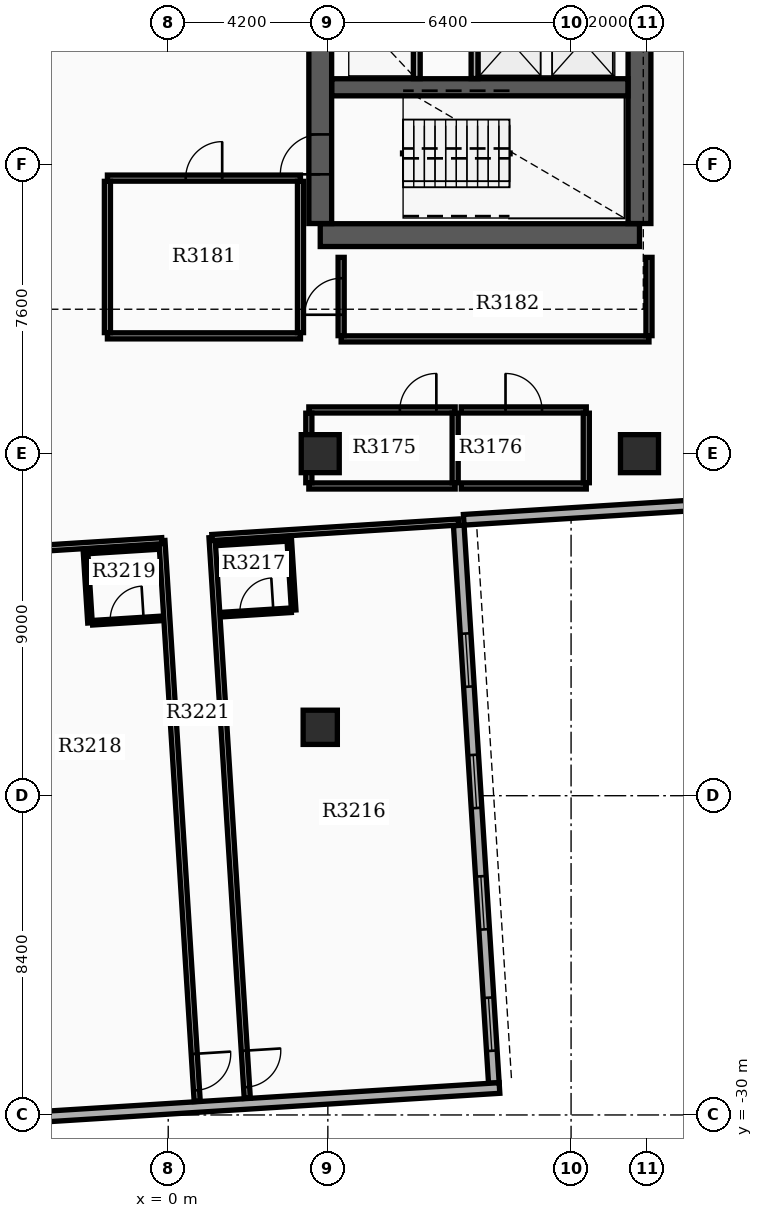
"""IFC4 building model, lengths in metres.
Left out: names, types, materials, properties, quantities, classifications, styles, units other than length and angle.
Written with IfcOpenShell. Run it as: python <this file> out.ifc"""

import sys

from ifc_helpers import new_model, si_unit, direction, frame, frame_2d, origin, origin_2d, place, context, subcontext, project, spatial, rectangle, extrude, element, fill, save


model = new_model("IFC4")
c1 = context("Model", 3, precision=1e-05, world=origin(), true_north=direction((0.0, 1.0)))
c2 = subcontext(c1, "Body", "Model", "MODEL_VIEW")
j1 = project(units=[si_unit("LENGTHUNIT", "METRE"), si_unit("PLANEANGLEUNIT", "RADIAN")], contexts=[c1])
p1 = place(None, origin())
s1 = spatial("IfcSite", under=j1, at=p1, CompositionType="ELEMENT")
p2 = place(p1, origin())
s2 = spatial("IfcBuilding", under=s1, at=p2, CompositionType="ELEMENT")
p3 = place(p2, frame((0.0, 0.0, 201.3)))
s3 = spatial("IfcBuildingStorey", under=s2, at=p3, CompositionType="ELEMENT", Elevation=201.3)
p4 = place(p3, frame((4.0, -6.85, 0.0), z_axis=(0.0, 0.0, 1.0), x_axis=(1.0, 0.0, 0.0)))
e1 = element("IfcWall", 1, at=p4, inside=s3, PredefinedType="SHEAR", context=c2, shape_type="SweptSolid", body=[
    extrude(rectangle(XDim=8.4, YDim=0.6, at=frame_2d((4.2, 0.0))), origin(), (0.0, 0.0, 1.0), 3.7),
])
p5 = place(p3, frame((4.0, -6.545, 0.0), z_axis=(0.0, 0.0, 1.0), x_axis=(0.0, 1.0, 0.0)))
e2 = element("IfcWall", 2, at=p5, inside=s3, PredefinedType="SHEAR", context=c2, shape_type="SweptSolid", body=[
    extrude(rectangle(XDim=11.19, YDim=0.6, at=frame_2d((5.595, 0.0))), origin(), (0.0, 0.0, 1.0), 3.7),
])
p6 = place(p5, frame((1.295, 0.0, 0.0)))
e3 = element("IfcOpeningElement", 3, at=p6, cuts=e2, PredefinedType="OPENING", context=c2, shape_type="SweptSolid", body=[
    extrude(rectangle(XDim=1.05, YDim=2.15, at=frame_2d((0.525, 1.075))), frame((0.0, 0.31, 0.0), z_axis=(0.0, -1.0, 0.0), x_axis=(1.0, 0.0, 0.0)), (0.0, 0.0, 1.0), 0.62),
])
p7 = place(p5, frame((6.895, 0.0, 0.0)))
e4 = element("IfcOpeningElement", 4, at=p7, cuts=e2, PredefinedType="OPENING", context=c2, shape_type="SweptSolid", body=[
    extrude(rectangle(XDim=1.05, YDim=2.15, at=frame_2d((0.525, 1.075))), frame((0.0, 0.31, 0.0), z_axis=(0.0, -1.0, 0.0), x_axis=(1.0, 0.0, 0.0)), (0.0, 0.0, 1.0), 0.62),
])
p8 = place(p3, frame((12.4, -6.545, 0.0), z_axis=(0.0, 0.0, 1.0), x_axis=(0.0, 1.0, 0.0)))
e5 = element("IfcWall", 5, at=p8, inside=s3, PredefinedType="SHEAR", context=c2, shape_type="SweptSolid", body=[
    extrude(rectangle(XDim=11.19, YDim=0.6, at=frame_2d((5.595, 0.0))), origin(), (0.0, 0.0, 1.0), 3.7),
])
p9 = place(p3, frame((4.305, -2.96, 0.0), z_axis=(0.0, 0.0, 1.0), x_axis=(1.0, 0.0, 0.0)))
e6 = element("IfcWall", 6, at=p9, inside=s3, PredefinedType="SHEAR", context=c2, shape_type="SweptSolid", body=[
    extrude(rectangle(XDim=7.79, YDim=0.45, at=frame_2d((3.895, 0.0))), origin(), (0.0, 0.0, 1.0), 3.7),
])
for number, where, z_axis, x_axis in (
    (7, (12.4, -12.6, 0.0), (0.0, 0.0, 1.0), (1.0, 0.0, 0.0)),
    (8, (4.0, -12.6, 0.0), (0.0, 0.0, 1.0), (1.0, 0.0, 0.0)),
):
    element("IfcColumn", number, at=place(p3, frame(where, z_axis=z_axis, x_axis=x_axis)), inside=s3, PredefinedType="COLUMN", context=c2, shape_type="SweptSolid", body=[
        extrude(rectangle(XDim=1.0, YDim=1.0, at=origin_2d()), origin(), (0.0, 0.0, 1.0), 3.9),
    ])
p10 = place(p3, frame((4.0, -19.8, 0.0), z_axis=(0.0, 0.0, 1.0), x_axis=(1.0, 0.0, 0.0)))
e9 = element("IfcColumn", 9, at=p10, inside=s3, PredefinedType="COLUMN", context=c2, shape_type="SweptSolid", body=[
    extrude(rectangle(XDim=0.9, YDim=0.9, at=origin_2d()), origin(), (0.0, 0.0, 1.0), 3.9),
])
p11 = place(p3, frame((8.568, -29.16, 0.0), z_axis=(0.0, 0.0, 1.0), x_axis=(-0.062794967833, 0.998026448555, 0.0)))
e10 = element("IfcWall", 10, at=p11, inside=s3, PredefinedType="STANDARD", context=c2, shape_type="SweptSolid", body=[
    extrude(rectangle(XDim=14.7, YDim=0.28, at=frame_2d((7.35, 0.0))), origin(), (0.0, 0.0, 1.0), 3.18),
])
p12 = place(p11, frame((0.85, 0.0, 0.8)))
e11 = element("IfcOpeningElement", 11, at=p12, cuts=e10, PredefinedType="OPENING", context=c2, shape_type="SweptSolid", body=[
    extrude(rectangle(XDim=1.4, YDim=1.6, at=frame_2d((0.7, 0.8))), frame((0.0, 0.15, 0.0), z_axis=(0.0, -1.0, 0.0), x_axis=(1.0, 0.0, 0.0)), (0.0, 0.0, 1.0), 0.3),
])
p13 = place(p11, frame((4.05, 0.0, 0.8)))
e12 = element("IfcOpeningElement", 12, at=p13, cuts=e10, PredefinedType="OPENING", context=c2, shape_type="SweptSolid", body=[
    extrude(rectangle(XDim=1.4, YDim=1.6, at=frame_2d((0.7, 0.8))), frame((0.0, 0.15, 0.0), z_axis=(0.0, -1.0, 0.0), x_axis=(1.0, 0.0, 0.0)), (0.0, 0.0, 1.0), 0.3),
])
p14 = place(p11, frame((7.25, 0.0, 0.8)))
e13 = element("IfcOpeningElement", 13, at=p14, cuts=e10, PredefinedType="OPENING", context=c2, shape_type="SweptSolid", body=[
    extrude(rectangle(XDim=1.4, YDim=1.6, at=frame_2d((0.7, 0.8))), frame((0.0, 0.15, 0.0), z_axis=(0.0, -1.0, 0.0), x_axis=(1.0, 0.0, 0.0)), (0.0, 0.0, 1.0), 0.3),
])
p15 = place(p11, frame((10.45, 0.0, 0.8)))
e14 = element("IfcOpeningElement", 14, at=p15, cuts=e10, PredefinedType="OPENING", context=c2, shape_type="SweptSolid", body=[
    extrude(rectangle(XDim=1.4, YDim=1.6, at=frame_2d((0.7, 0.8))), frame((0.0, 0.15, 0.0), z_axis=(0.0, -1.0, 0.0), x_axis=(1.0, 0.0, 0.0)), (0.0, 0.0, 1.0), 0.3),
])
p16 = place(p3, frame((-4.977, -30.152, 0.0), z_axis=(0.0, 0.0, 1.0), x_axis=(0.998026318072, 0.062797041623, 0.0)))
e15 = element("IfcWall", 15, at=p16, inside=s3, PredefinedType="STANDARD", context=c2, shape_type="SweptSolid", body=[
    extrude(rectangle(XDim=13.72, YDim=0.28, at=frame_2d((6.86, 0.0))), origin(), (0.0, 0.0, 1.0), 3.18),
])
p17 = place(p16, frame((0.85, 0.0, 0.85)))
e16 = element("IfcOpeningElement", 16, at=p17, cuts=e15, PredefinedType="OPENING", context=c2, shape_type="SweptSolid", body=[
    extrude(rectangle(XDim=1.0, YDim=1.5, at=frame_2d((0.5, 0.75))), frame((0.0, 0.15, 0.0), z_axis=(0.0, -1.0, 0.0), x_axis=(1.0, 0.0, 0.0)), (0.0, 0.0, 1.0), 0.3),
])
p18 = place(p3, frame((14.063, -13.945, 0.0), z_axis=(0.0, 0.0, 1.0), x_axis=(-0.998027314704, -0.062781200242, 0.0)))
e17 = element("IfcWall", 17, at=p18, inside=s3, PredefinedType="STANDARD", context=c2, shape_type="SweptSolid", body=[
    extrude(rectangle(XDim=6.3, YDim=0.28, at=frame_2d((3.15, 0.0))), origin(), (0.0, 0.0, 1.0), 3.18),
])
for number, where, z_axis, x_axis in (
    (18, (6.54, -2.73, 0.0), (0.0, 0.0, 1.0), (0.0, 1.0, 0.0)),
    (19, (8.06, -2.73, 0.0), (0.0, 0.0, 1.0), (0.0, 1.0, 0.0)),
):
    element("IfcWall", number, at=place(p3, frame(where, z_axis=z_axis, x_axis=x_axis)), inside=s3, PredefinedType="SOLIDWALL", context=c2, shape_type="SweptSolid", body=[
        extrude(rectangle(XDim=1.89, YDim=0.18, at=frame_2d((0.945, 0.0))), origin(), (0.0, 0.0, 1.0), 3.17),
    ])
p19 = place(p3, frame((3.7, -13.45, 0.0), z_axis=(0.0, 0.0, 1.0), x_axis=(1.0, 0.0, 0.0)))
e20 = element("IfcWall", 20, at=p19, inside=s3, PredefinedType="PARTITIONING", context=c2, shape_type="SweptSolid", body=[
    extrude(rectangle(XDim=3.85, YDim=0.16, at=frame_2d((1.925, 0.0))), origin(), (0.0, 0.0, 1.0), 3.17),
])
p20 = place(p3, frame((3.7, -11.45, 0.0), z_axis=(0.0, 0.0, 1.0), x_axis=(1.0, 0.0, 0.0)))
e21 = element("IfcWall", 21, at=p20, inside=s3, PredefinedType="PARTITIONING", context=c2, shape_type="SweptSolid", body=[
    extrude(rectangle(XDim=3.85, YDim=0.16, at=frame_2d((1.925, 0.0))), origin(), (0.0, 0.0, 1.0), 3.17),
])
p21 = place(p20, frame((2.395, 0.0, 0.0)))
e22 = element("IfcOpeningElement", 22, at=p21, cuts=e21, PredefinedType="OPENING", context=c2, shape_type="SweptSolid", body=[
    extrude(rectangle(XDim=0.96, YDim=2.15, at=frame_2d((0.48, 1.075))), frame((0.0, 0.09, 0.0), z_axis=(0.0, -1.0, 0.0), x_axis=(1.0, 0.0, 0.0)), (0.0, 0.0, 1.0), 0.18),
])
for number, where, z_axis, x_axis in (
    (23, (3.7, -13.365, 0.0), (0.0, 0.0, 1.0), (0.0, 1.0, 0.0)),
    (24, (7.55, -13.365, 0.0), (0.0, 0.0, 1.0), (0.0, 1.0, 0.0)),
):
    element("IfcWall", number, at=place(p3, frame(where, z_axis=z_axis, x_axis=x_axis)), inside=s3, PredefinedType="PARTITIONING", context=c2, shape_type="SweptSolid", body=[
        extrude(rectangle(XDim=1.83, YDim=0.16, at=frame_2d((0.915, 0.0))), origin(), (0.0, 0.0, 1.0), 3.17),
    ])
p22 = place(p3, frame((7.71, -13.45, 0.0), z_axis=(0.0, 0.0, 1.0), x_axis=(1.0, 0.0, 0.0)))
e25 = element("IfcWall", 25, at=p22, inside=s3, PredefinedType="PARTITIONING", context=c2, shape_type="SweptSolid", body=[
    extrude(rectangle(XDim=3.29, YDim=0.16, at=frame_2d((1.645, 0.0))), origin(), (0.0, 0.0, 1.0), 3.17),
])
p23 = place(p3, frame((7.71, -11.45, 0.0), z_axis=(0.0, 0.0, 1.0), x_axis=(1.0, 0.0, 0.0)))
e26 = element("IfcWall", 26, at=p23, inside=s3, PredefinedType="PARTITIONING", context=c2, shape_type="SweptSolid", body=[
    extrude(rectangle(XDim=3.29, YDim=0.16, at=frame_2d((1.645, 0.0))), origin(), (0.0, 0.0, 1.0), 3.17),
])
p24 = place(p23, frame((1.165, 0.0, 0.0)))
e27 = element("IfcOpeningElement", 27, at=p24, cuts=e26, PredefinedType="OPENING", context=c2, shape_type="SweptSolid", body=[
    extrude(rectangle(XDim=0.96, YDim=2.15, at=frame_2d((0.48, 1.075))), frame((0.0, 0.09, 0.0), z_axis=(0.0, -1.0, 0.0), x_axis=(1.0, 0.0, 0.0)), (0.0, 0.0, 1.0), 0.18),
])
p25 = place(p3, frame((11.0, -13.365, 0.0), z_axis=(0.0, 0.0, 1.0), x_axis=(0.0, 1.0, 0.0)))
e28 = element("IfcWall", 28, at=p25, inside=s3, PredefinedType="PARTITIONING", context=c2, shape_type="SweptSolid", body=[
    extrude(rectangle(XDim=1.83, YDim=0.16, at=frame_2d((0.915, 0.0))), origin(), (0.0, 0.0, 1.0), 3.17),
])
p26 = place(p3, frame((-1.6, -9.5, 0.0), z_axis=(0.0, 0.0, 1.0), x_axis=(1.0, 0.0, 0.0)))
e29 = element("IfcWall", 29, at=p26, inside=s3, PredefinedType="PARTITIONING", context=c2, shape_type="SweptSolid", body=[
    extrude(rectangle(XDim=5.08, YDim=0.16, at=frame_2d((2.54, 0.0))), origin(), (0.0, 0.0, 1.0), 3.17),
])
p27 = place(p3, frame((-1.6, -5.35, 0.0), z_axis=(0.0, 0.0, 1.0), x_axis=(1.0, 0.0, 0.0)))
e30 = element("IfcWall", 30, at=p27, inside=s3, PredefinedType="PARTITIONING", context=c2, shape_type="SweptSolid", body=[
    extrude(rectangle(XDim=5.08, YDim=0.16, at=frame_2d((2.54, 0.0))), origin(), (0.0, 0.0, 1.0), 3.17),
])
p28 = place(p27, frame((2.06, 0.0, 0.0)))
e31 = element("IfcOpeningElement", 31, at=p28, cuts=e30, PredefinedType="OPENING", context=c2, shape_type="SweptSolid", body=[
    extrude(rectangle(XDim=0.96, YDim=2.15, at=frame_2d((0.48, 1.075))), frame((0.0, 0.09, 0.0), z_axis=(0.0, -1.0, 0.0), x_axis=(1.0, 0.0, 0.0)), (0.0, 0.0, 1.0), 0.18),
])
for number, where, z_axis, x_axis in (
    (32, (-1.6, -9.415, 0.0), (0.0, 0.0, 1.0), (0.0, 1.0, 0.0)),
    (33, (3.48, -9.415, 0.0), (0.0, 0.0, 1.0), (0.0, 1.0, 0.0)),
):
    element("IfcWall", number, at=place(p3, frame(where, z_axis=z_axis, x_axis=x_axis)), inside=s3, PredefinedType="PARTITIONING", context=c2, shape_type="SweptSolid", body=[
        extrude(rectangle(XDim=3.98, YDim=0.16, at=frame_2d((1.99, 0.0))), origin(), (0.0, 0.0, 1.0), 3.17),
    ])
p29 = place(p3, frame((4.55, -9.58, 0.0), z_axis=(0.0, 0.0, 1.0), x_axis=(1.0, 0.0, 0.0)))
e34 = element("IfcWall", 34, at=p29, inside=s3, PredefinedType="PARTITIONING", context=c2, shape_type="SweptSolid", body=[
    extrude(rectangle(XDim=8.1, YDim=0.16, at=frame_2d((4.05, 0.0))), origin(), (0.0, 0.0, 1.0), 3.17),
])
p30 = place(p3, frame((4.55, -9.495, 0.0), z_axis=(0.0, 0.0, 1.0), x_axis=(0.0, 1.0, 0.0)))
e35 = element("IfcWall", 35, at=p30, inside=s3, PredefinedType="PARTITIONING", context=c2, shape_type="SweptSolid", body=[
    extrude(rectangle(XDim=2.06, YDim=0.16, at=frame_2d((1.03, 0.0))), origin(), (0.0, 0.0, 1.0), 3.17),
])
p31 = place(p30, frame((0.55, 0.0, 0.0)))
e36 = element("IfcOpeningElement", 36, at=p31, cuts=e35, PredefinedType="OPENING", context=c2, shape_type="SweptSolid", body=[
    extrude(rectangle(XDim=0.96, YDim=2.15, at=frame_2d((0.48, 1.075))), frame((0.0, 0.09, 0.0), z_axis=(0.0, -1.0, 0.0), x_axis=(1.0, 0.0, 0.0)), (0.0, 0.0, 1.0), 0.18),
])
p32 = place(p3, frame((12.65, -9.495, 0.0), z_axis=(0.0, 0.0, 1.0), x_axis=(0.0, 1.0, 0.0)))
e37 = element("IfcWall", 37, at=p32, inside=s3, PredefinedType="PARTITIONING", context=c2, shape_type="SweptSolid", body=[
    extrude(rectangle(XDim=2.06, YDim=0.16, at=frame_2d((1.03, 0.0))), origin(), (0.0, 0.0, 1.0), 3.17),
])
p33 = place(p3, frame((1.152, -14.807, 0.0), z_axis=(0.0, 0.0, 1.0), x_axis=(0.062777235242, -0.998027564116, 0.0)))
e38 = element("IfcWall", 38, at=p33, inside=s3, PredefinedType="PARTITIONING", context=c2, shape_type="SweptSolid", body=[
    extrude(rectangle(XDim=14.782, YDim=0.16, at=frame_2d((7.391, 0.0))), origin(), (0.0, 0.0, 1.0), 3.17),
])
p34 = place(p33, frame((13.53, 0.0, 0.0)))
e39 = element("IfcOpeningElement", 39, at=p34, cuts=e38, PredefinedType="OPENING", context=c2, shape_type="SweptSolid", body=[
    extrude(rectangle(XDim=0.96, YDim=2.15, at=frame_2d((0.48, 1.075))), frame((0.0, 0.09, 0.0), z_axis=(0.0, -1.0, 0.0), x_axis=(1.0, 0.0, 0.0)), (0.0, 0.0, 1.0), 0.18),
])
p35 = place(p3, frame((1.152, -14.807, 0.0), z_axis=(0.0, 0.0, 1.0), x_axis=(0.998026035463, 0.062801532923, 0.0)))
e40 = element("IfcWall", 40, at=p35, inside=s3, PredefinedType="PARTITIONING", context=c2, shape_type="SweptSolid", body=[
    extrude(rectangle(XDim=6.5, YDim=0.16, at=frame_2d((3.25, 0.0))), origin(), (0.0, 0.0, 1.0), 3.17),
])
p36 = place(p3, frame((1.42, -16.834, 0.0), z_axis=(0.0, 0.0, 1.0), x_axis=(0.998026915151, 0.062787551592, 0.0)))
e41 = element("IfcWall", 41, at=p36, inside=s3, PredefinedType="PARTITIONING", context=c2, shape_type="SweptSolid", body=[
    extrude(rectangle(XDim=1.82, YDim=0.12, at=frame_2d((0.91, 0.0))), origin(), (0.0, 0.0, 1.0), 3.17),
])
p37 = place(p36, frame((0.47, 0.0, 0.0)))
e42 = element("IfcOpeningElement", 42, at=p37, cuts=e41, PredefinedType="OPENING", context=c2, shape_type="SweptSolid", body=[
    extrude(rectangle(XDim=0.88, YDim=2.1, at=frame_2d((0.44, 1.05))), frame((0.0, 0.07, 0.0), z_axis=(0.0, -1.0, 0.0), x_axis=(1.0, 0.0, 0.0)), (0.0, 0.0, 1.0), 0.14),
])
p38 = place(p3, frame((1.302, -14.958, 0.0), z_axis=(0.0, 0.0, 1.0), x_axis=(0.998027443946, 0.062779145668, 0.0)))
e43 = element("IfcWall", 43, at=p38, inside=s3, PredefinedType="PARTITIONING", context=c2, shape_type="SweptSolid", body=[
    extrude(rectangle(XDim=1.82, YDim=0.12, at=frame_2d((0.91, 0.0))), origin(), (0.0, 0.0, 1.0), 3.17),
])
p39 = place(p3, frame((3.183, -14.839, 0.0), z_axis=(0.0, 0.0, 1.0), x_axis=(0.062717813936, -0.998031300018, 0.0)))
e44 = element("IfcWall", 44, at=p39, inside=s3, PredefinedType="PARTITIONING", context=c2, shape_type="SweptSolid", body=[
    extrude(rectangle(XDim=1.88, YDim=0.12, at=frame_2d((0.94, 0.0))), origin(), (0.0, 0.0, 1.0), 3.17),
])
p40 = place(p3, frame((-0.165, -14.89, 0.0), z_axis=(0.0, 0.0, 1.0), x_axis=(0.062778270041, -0.998027499025, 0.0)))
e45 = element("IfcWall", 45, at=p40, inside=s3, PredefinedType="PARTITIONING", context=c2, shape_type="SweptSolid", body=[
    extrude(rectangle(XDim=14.782, YDim=0.16, at=frame_2d((7.391, 0.0))), origin(), (0.0, 0.0, 1.0), 3.17),
])
p41 = place(p40, frame((13.53, 0.0, 0.0)))
e46 = element("IfcOpeningElement", 46, at=p41, cuts=e45, PredefinedType="OPENING", context=c2, shape_type="SweptSolid", body=[
    extrude(rectangle(XDim=0.96, YDim=2.15, at=frame_2d((0.48, 1.075))), frame((0.0, 0.09, 0.0), z_axis=(0.0, -1.0, 0.0), x_axis=(1.0, 0.0, 0.0)), (0.0, 0.0, 1.0), 0.18),
])
p42 = place(p3, frame((-0.165, -14.89, 0.0), z_axis=(0.0, 0.0, 1.0), x_axis=(-0.998027992644, -0.062770422171, 0.0)))
e47 = element("IfcWall", 47, at=p42, inside=s3, PredefinedType="PARTITIONING", context=c2, shape_type="SweptSolid", body=[
    extrude(rectangle(XDim=5.62, YDim=0.16, at=frame_2d((2.81, 0.0))), origin(), (0.0, 0.0, 1.0), 3.17),
])
p43 = place(p3, frame((-1.993, -17.049, 0.0), z_axis=(0.0, 0.0, 1.0), x_axis=(0.998027443946, 0.062779145668, 0.0)))
e48 = element("IfcWall", 48, at=p43, inside=s3, PredefinedType="PARTITIONING", context=c2, shape_type="SweptSolid", body=[
    extrude(rectangle(XDim=1.82, YDim=0.12, at=frame_2d((0.91, 0.0))), origin(), (0.0, 0.0, 1.0), 3.17),
])
p44 = place(p43, frame((0.47, 0.0, 0.0)))
e49 = element("IfcOpeningElement", 49, at=p44, cuts=e48, PredefinedType="OPENING", context=c2, shape_type="SweptSolid", body=[
    extrude(rectangle(XDim=0.88, YDim=2.1, at=frame_2d((0.44, 1.05))), frame((0.0, 0.07, 0.0), z_axis=(0.0, -1.0, 0.0), x_axis=(1.0, 0.0, 0.0)), (0.0, 0.0, 1.0), 0.14),
])
p45 = place(p3, frame((-2.112, -15.173, 0.0), z_axis=(0.0, 0.0, 1.0), x_axis=(0.998019030272, 0.062912758763, 0.0)))
e50 = element("IfcWall", 50, at=p45, inside=s3, PredefinedType="PARTITIONING", context=c2, shape_type="SweptSolid", body=[
    extrude(rectangle(XDim=1.82, YDim=0.12, at=frame_2d((0.91, 0.0))), origin(), (0.0, 0.0, 1.0), 3.17),
])
p46 = place(p3, frame((-2.176, -15.177, 0.0), z_axis=(0.0, 0.0, 1.0), x_axis=(0.062717813936, -0.998031300018, 0.0)))
e51 = element("IfcWall", 51, at=p46, inside=s3, PredefinedType="PARTITIONING", context=c2, shape_type="SweptSolid", body=[
    extrude(rectangle(XDim=1.88, YDim=0.12, at=frame_2d((0.94, 0.0))), origin(), (0.0, 0.0, 1.0), 3.17),
])
p47 = place(p12, origin())
e52 = element("IfcWindow", 52, at=p47, inside=s3, PartitioningType="SINGLE_PANEL", PredefinedType="WINDOW", context=c2, shape_type="SweptSolid", body=[
    extrude(rectangle(XDim=1.4, YDim=1.6, at=frame_2d((0.7, 0.8))), frame((0.0, 0.03, 0.0), z_axis=(0.0, -1.0, 0.0), x_axis=(1.0, 0.0, 0.0)), (0.0, 0.0, 1.0), 0.06),
])
fill(e11, e52)
p48 = place(p13, origin())
e53 = element("IfcWindow", 53, at=p48, inside=s3, PartitioningType="SINGLE_PANEL", PredefinedType="WINDOW", context=c2, shape_type="SweptSolid", body=[
    extrude(rectangle(XDim=1.4, YDim=1.6, at=frame_2d((0.7, 0.8))), frame((0.0, 0.03, 0.0), z_axis=(0.0, -1.0, 0.0), x_axis=(1.0, 0.0, 0.0)), (0.0, 0.0, 1.0), 0.06),
])
fill(e12, e53)
p49 = place(p14, origin())
e54 = element("IfcWindow", 54, at=p49, inside=s3, PartitioningType="SINGLE_PANEL", PredefinedType="WINDOW", context=c2, shape_type="SweptSolid", body=[
    extrude(rectangle(XDim=1.4, YDim=1.6, at=frame_2d((0.7, 0.8))), frame((0.0, 0.03, 0.0), z_axis=(0.0, -1.0, 0.0), x_axis=(1.0, 0.0, 0.0)), (0.0, 0.0, 1.0), 0.06),
])
fill(e13, e54)
p50 = place(p15, origin())
e55 = element("IfcWindow", 55, at=p50, inside=s3, PartitioningType="SINGLE_PANEL", PredefinedType="WINDOW", context=c2, shape_type="SweptSolid", body=[
    extrude(rectangle(XDim=1.4, YDim=1.6, at=frame_2d((0.7, 0.8))), frame((0.0, 0.03, 0.0), z_axis=(0.0, -1.0, 0.0), x_axis=(1.0, 0.0, 0.0)), (0.0, 0.0, 1.0), 0.06),
])
fill(e14, e55)
p51 = place(p6, origin())
e56 = element("IfcDoor", 56, at=p51, inside=s3, OperationType="SINGLE_SWING_LEFT", PredefinedType="DOOR", context=c2, shape_type="SweptSolid", body=[
    extrude(rectangle(XDim=1.05, YDim=2.15, at=frame_2d((0.525, 1.075))), frame((0.0, 0.025, 0.0), z_axis=(0.0, -1.0, 0.0), x_axis=(1.0, 0.0, 0.0)), (0.0, 0.0, 1.0), 0.05),
])
fill(e3, e56)
p52 = place(p21, origin())
e57 = element("IfcDoor", 57, at=p52, inside=s3, OperationType="SINGLE_SWING_RIGHT", PredefinedType="DOOR", context=c2, shape_type="SweptSolid", body=[
    extrude(rectangle(XDim=0.96, YDim=2.15, at=frame_2d((0.48, 1.075))), frame((0.0, 0.025, 0.0), z_axis=(0.0, -1.0, 0.0), x_axis=(1.0, 0.0, 0.0)), (0.0, 0.0, 1.0), 0.05),
])
fill(e22, e57)
p53 = place(p24, origin())
e58 = element("IfcDoor", 58, at=p53, inside=s3, OperationType="SINGLE_SWING_LEFT", PredefinedType="DOOR", context=c2, shape_type="SweptSolid", body=[
    extrude(rectangle(XDim=0.96, YDim=2.15, at=frame_2d((0.48, 1.075))), frame((0.0, 0.025, 0.0), z_axis=(0.0, -1.0, 0.0), x_axis=(1.0, 0.0, 0.0)), (0.0, 0.0, 1.0), 0.05),
])
fill(e27, e58)
p54 = place(p28, origin())
e59 = element("IfcDoor", 59, at=p54, inside=s3, OperationType="SINGLE_SWING_RIGHT", PredefinedType="DOOR", context=c2, shape_type="SweptSolid", body=[
    extrude(rectangle(XDim=0.96, YDim=2.15, at=frame_2d((0.48, 1.075))), frame((0.0, 0.025, 0.0), z_axis=(0.0, -1.0, 0.0), x_axis=(1.0, 0.0, 0.0)), (0.0, 0.0, 1.0), 0.05),
])
fill(e31, e59)
p55 = place(p31, origin())
e60 = element("IfcDoor", 60, at=p55, inside=s3, OperationType="SINGLE_SWING_LEFT", PredefinedType="DOOR", context=c2, shape_type="SweptSolid", body=[
    extrude(rectangle(XDim=0.96, YDim=2.15, at=frame_2d((0.48, 1.075))), frame((0.0, 0.025, 0.0), z_axis=(0.0, -1.0, 0.0), x_axis=(1.0, 0.0, 0.0)), (0.0, 0.0, 1.0), 0.05),
])
fill(e36, e60)
p56 = place(p34, origin())
e61 = element("IfcDoor", 61, at=p56, inside=s3, OperationType="SINGLE_SWING_LEFT", PredefinedType="DOOR", context=c2, shape_type="SweptSolid", body=[
    extrude(rectangle(XDim=0.96, YDim=2.15, at=frame_2d((0.48, 1.075))), frame((0.0, 0.025, 0.0), z_axis=(0.0, -1.0, 0.0), x_axis=(1.0, 0.0, 0.0)), (0.0, 0.0, 1.0), 0.05),
])
fill(e39, e61)
p57 = place(p37, origin())
e62 = element("IfcDoor", 62, at=p57, inside=s3, OperationType="SINGLE_SWING_RIGHT", PredefinedType="DOOR", context=c2, shape_type="SweptSolid", body=[
    extrude(rectangle(XDim=0.88, YDim=2.1, at=frame_2d((0.44, 1.05))), frame((0.0, 0.025, 0.0), z_axis=(0.0, -1.0, 0.0), x_axis=(1.0, 0.0, 0.0)), (0.0, 0.0, 1.0), 0.05),
])
fill(e42, e62)
p58 = place(p41, origin())
e63 = element("IfcDoor", 63, at=p58, inside=s3, OperationType="SINGLE_SWING_LEFT", PredefinedType="DOOR", context=c2, shape_type="SweptSolid", body=[
    extrude(rectangle(XDim=0.96, YDim=2.15, at=frame_2d((0.48, 1.075))), frame((0.0, 0.025, 0.0), z_axis=(0.0, -1.0, 0.0), x_axis=(1.0, 0.0, 0.0)), (0.0, 0.0, 1.0), 0.05),
])
fill(e46, e63)
p59 = place(p44, origin())
e64 = element("IfcDoor", 64, at=p59, inside=s3, OperationType="SINGLE_SWING_RIGHT", PredefinedType="DOOR", context=c2, shape_type="SweptSolid", body=[
    extrude(rectangle(XDim=0.88, YDim=2.1, at=frame_2d((0.44, 1.05))), frame((0.0, 0.025, 0.0), z_axis=(0.0, -1.0, 0.0), x_axis=(1.0, 0.0, 0.0)), (0.0, 0.0, 1.0), 0.05),
])
fill(e49, e64)
save(model, sys.argv[1])
